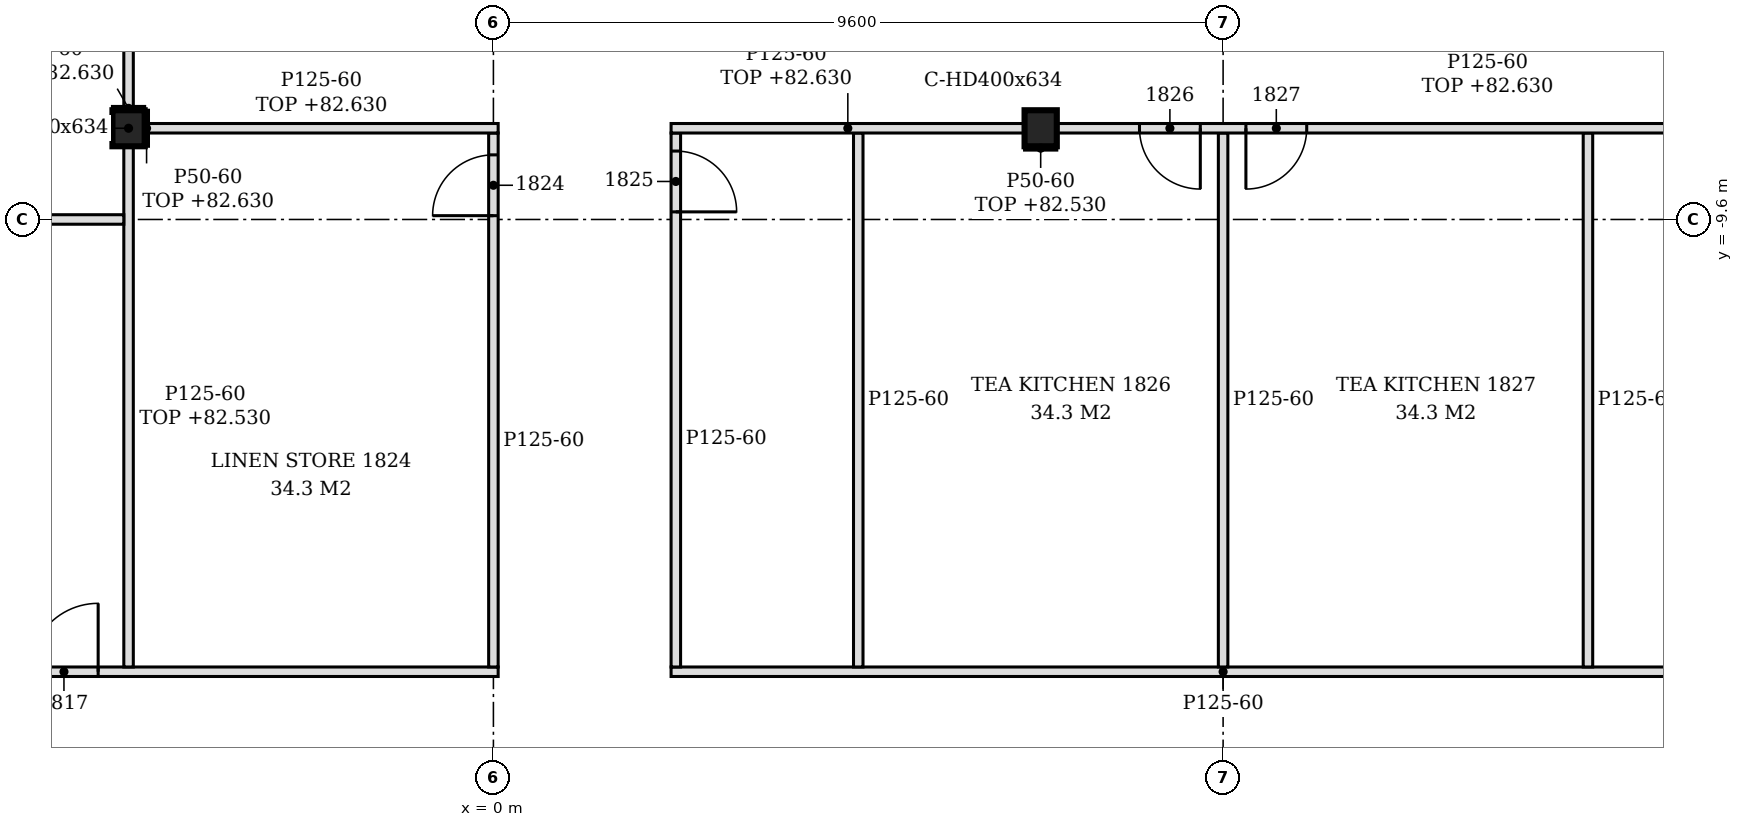
"""IFC4 building model, lengths in metres.
Left out: names, types, materials, properties, quantities, classifications, styles, units other than length and angle.
Written with IfcOpenShell. Run it as: python <this file> out.ifc"""

import sys

from ifc_helpers import new_model, si_unit, direction, frame, frame_2d, origin, origin_2d, place, context, subcontext, project, spatial, polyline, rectangle, i_section, outline, extrude, element, fill, save


model = new_model("IFC4")
c1 = context("Model", 3, precision=1e-05, world=origin(), true_north=direction((0.0, 1.0)))
c2 = subcontext(c1, "Body", "Model", "MODEL_VIEW")
j1 = project(units=[si_unit("LENGTHUNIT", "METRE"), si_unit("PLANEANGLEUNIT", "RADIAN")], contexts=[c1])
p1 = place(None, origin())
s1 = spatial("IfcSite", under=j1, at=p1, CompositionType="ELEMENT")
p2 = place(p1, origin())
s2 = spatial("IfcBuilding", under=s1, at=p2, CompositionType="ELEMENT")
p3 = place(p2, frame((0.0, 0.0, 79.8)))
s3 = spatial("IfcBuildingStorey", under=s2, at=p3, CompositionType="ELEMENT", Elevation=79.8)
for number, where, z_axis, x_axis in (
    (1, (-4.8, -8.4, -0.15), (0.0, 0.0, 1.0), (1.0, 0.0, 0.0)),
    (2, (7.2, -8.4, -0.15), (0.0, 0.0, 1.0), (1.0, 0.0, 0.0)),
):
    element("IfcColumn", number, at=place(p3, frame(where, z_axis=z_axis, x_axis=x_axis)), inside=s3, PredefinedType="COLUMN", context=c2, shape_type="SweptSolid", body=[
        extrude(i_section(OverallWidth=0.424, OverallDepth=0.474, WebThickness=0.048, FlangeThickness=0.077, FilletRadius=0.015, at=origin_2d()), origin(), (0.0, 0.0, 1.0), 3.6),
    ])
p4 = place(p3, frame((-18.413, -15.55, 0.0), z_axis=(0.0, 0.0, 1.0), x_axis=(1.0, 0.0, 0.0)))
e3 = element("IfcWall", 3, at=p4, inside=s3, PredefinedType="PARTITIONING", context=c2, shape_type="SweptSolid", body=[
    extrude(outline(polyline([(0.0, 0.0), (18.475, 0.0), (18.475, 3.45), (13.762, 3.45), (13.76, 2.73), (13.462, 2.73), (13.46, 3.45), (4.163, 3.45), (4.16, 2.93), (3.863, 2.93), (3.861, 3.45), (0.0, 3.45), (0.0, 0.0)])), frame((0.0, 0.062, 0.0), z_axis=(0.0, -1.0, 0.0), x_axis=(1.0, 0.0, 0.0)), (0.0, 0.0, 1.0), 0.125),
])
p5 = place(p4, frame((12.312, 0.0, 0.0)))
e4 = element("IfcOpeningElement", 4, at=p5, cuts=e3, PredefinedType="OPENING", context=c2, shape_type="SweptSolid", body=[
    extrude(rectangle(XDim=0.9, YDim=2.1, at=frame_2d((0.45, 1.05))), frame((0.0, 0.073, 0.0), z_axis=(0.0, -1.0, 0.0), x_axis=(1.0, 0.0, 0.0)), (0.0, 0.0, 1.0), 0.145),
])
p6 = place(p3, frame((2.337, -15.55, 0.0), z_axis=(0.0, 0.0, 1.0), x_axis=(1.0, 0.0, 0.0)))
e5 = element("IfcWall", 5, at=p6, inside=s3, PredefinedType="PARTITIONING", context=c2, shape_type="SweptSolid", body=[
    extrude(outline(polyline([(0.0, 0.0), (14.525, 0.0), (14.525, 3.45), (5.012, 3.45), (5.01, 2.73), (4.712, 2.73), (4.71, 3.45), (0.0, 3.45), (0.0, 0.0)])), frame((0.0, 0.062, 0.0), z_axis=(0.0, -1.0, 0.0), x_axis=(1.0, 0.0, 0.0)), (0.0, 0.0, 1.0), 0.125),
])
p7 = place(p3, frame((-4.8, -15.488, 0.0), z_axis=(0.0, 0.0, 1.0), x_axis=(0.0, 1.0, 0.0)))
e6 = element("IfcWall", 6, at=p7, inside=s3, PredefinedType="PARTITIONING", context=c2, shape_type="SweptSolid", body=[
    extrude(rectangle(XDim=6.851, YDim=0.125, at=frame_2d((3.425, 0.0))), origin(), (0.0, 0.0, 1.0), 2.73),
])
p8 = place(p3, frame((0.0, -15.488, 0.0), z_axis=(0.0, 0.0, 1.0), x_axis=(0.0, 1.0, 0.0)))
e7 = element("IfcWall", 7, at=p8, inside=s3, PredefinedType="PARTITIONING", context=c2, shape_type="SweptSolid", body=[
    extrude(outline(polyline([(0.0, 0.0), (7.025, 0.0), (7.025, 2.83), (6.938, 2.83), (6.936, 3.45), (1.192, 3.45), (1.19, 2.88), (0.982, 2.88), (0.98, 3.45), (0.0, 3.45), (0.0, 0.0)])), frame((0.0, 0.062, 0.0), z_axis=(0.0, -1.0, 0.0), x_axis=(1.0, 0.0, 0.0)), (0.0, 0.0, 1.0), 0.125),
])
p9 = place(p8, frame((5.938, 0.0, 0.0)))
e8 = element("IfcOpeningElement", 8, at=p9, cuts=e7, PredefinedType="OPENING", context=c2, shape_type="SweptSolid", body=[
    extrude(rectangle(XDim=0.8, YDim=2.1, at=frame_2d((0.4, 1.05))), frame((0.0, 0.073, 0.0), z_axis=(0.0, -1.0, 0.0), x_axis=(1.0, 0.0, 0.0)), (0.0, 0.0, 1.0), 0.145),
])
p10 = place(p3, frame((2.4, -15.488, 0.0), z_axis=(0.0, 0.0, 1.0), x_axis=(0.0, 1.0, 0.0)))
e9 = element("IfcWall", 9, at=p10, inside=s3, PredefinedType="PARTITIONING", context=c2, shape_type="SweptSolid", body=[
    extrude(outline(polyline([(0.0, 0.0), (7.025, 0.0), (7.025, 2.83), (6.938, 2.83), (6.936, 3.45), (1.192, 3.45), (1.19, 2.88), (0.982, 2.88), (0.98, 3.45), (0.0, 3.45), (0.0, 0.0)])), frame((0.0, 0.062, 0.0), z_axis=(0.0, -1.0, 0.0), x_axis=(1.0, 0.0, 0.0)), (0.0, 0.0, 1.0), 0.125),
])
p11 = place(p10, frame((5.988, 0.0, 0.0)))
e10 = element("IfcOpeningElement", 10, at=p11, cuts=e9, PredefinedType="OPENING", context=c2, shape_type="SweptSolid", body=[
    extrude(rectangle(XDim=0.8, YDim=2.1, at=frame_2d((0.4, 1.05))), frame((0.0, 0.073, 0.0), z_axis=(0.0, -1.0, 0.0), x_axis=(1.0, 0.0, 0.0)), (0.0, 0.0, 1.0), 0.145),
])
for number, where, z_axis, x_axis in (
    (11, (4.8, -15.488, 0.0), (0.0, 0.0, 1.0), (0.0, 1.0, 0.0)),
    (12, (9.6, -15.488, 0.0), (0.0, 0.0, 1.0), (0.0, 1.0, 0.0)),
    (13, (14.4, -15.488, 0.0), (0.0, 0.0, 1.0), (0.0, 1.0, 0.0)),
):
    element("IfcWall", number, at=place(p3, frame(where, z_axis=z_axis, x_axis=x_axis)), inside=s3, PredefinedType="PARTITIONING", context=c2, shape_type="SweptSolid", body=[
        extrude(outline(polyline([(0.0, 0.0), (7.025, 0.0), (7.025, 2.83), (6.938, 2.83), (6.936, 3.45), (1.192, 3.45), (1.19, 2.88), (0.982, 2.88), (0.98, 3.45), (0.0, 3.45), (0.0, 0.0)])), frame((0.0, 0.062, 0.0), z_axis=(0.0, -1.0, 0.0), x_axis=(1.0, 0.0, 0.0)), (0.0, 0.0, 1.0), 0.125),
    ])
p12 = place(p3, frame((-14.196, -9.6, 0.0), z_axis=(0.0, 0.0, 1.0), x_axis=(1.0, 0.0, 0.0)))
e14 = element("IfcWall", 14, at=p12, inside=s3, PredefinedType="PARTITIONING", context=c2, shape_type="SweptSolid", body=[
    extrude(outline(polyline([(0.0, 0.0), (9.333, 0.0), (9.333, 2.73), (9.246, 2.73), (9.243, 2.93), (0.0, 2.93), (0.0, 0.0)])), frame((0.0, 0.062, 0.0), z_axis=(0.0, -1.0, 0.0), x_axis=(1.0, 0.0, 0.0)), (0.0, 0.0, 1.0), 0.125),
])
p13 = place(p3, frame((-4.588, -8.4, 0.0), z_axis=(0.0, 0.0, 1.0), x_axis=(1.0, 0.0, 0.0)))
e15 = element("IfcWall", 15, at=p13, inside=s3, PredefinedType="PARTITIONING", context=c2, shape_type="SweptSolid", body=[
    extrude(rectangle(XDim=4.65, YDim=0.125, at=frame_2d((2.325, 0.0))), origin(), (0.0, 0.0, 1.0), 2.83),
])
p14 = place(p3, frame((2.337, -8.4, 0.0), z_axis=(0.0, 0.0, 1.0), x_axis=(1.0, 0.0, 0.0)))
e16 = element("IfcWall", 16, at=p14, inside=s3, PredefinedType="PARTITIONING", context=c2, shape_type="SweptSolid", body=[
    extrude(rectangle(XDim=4.651, YDim=0.125, at=frame_2d((2.325, 0.0))), origin(), (0.0, 0.0, 1.0), 2.83),
])
p15 = place(p3, frame((7.412, -8.4, 0.0), z_axis=(0.0, 0.0, 1.0), x_axis=(1.0, 0.0, 0.0)))
e17 = element("IfcWall", 17, at=p15, inside=s3, PredefinedType="PARTITIONING", context=c2, shape_type="SweptSolid", body=[
    extrude(rectangle(XDim=9.45, YDim=0.125, at=frame_2d((4.725, 0.0))), origin(), (0.0, 0.0, 1.0), 2.83),
])
p16 = place(p15, frame((1.088, 0.0, 0.0)))
e18 = element("IfcOpeningElement", 18, at=p16, cuts=e17, PredefinedType="OPENING", context=c2, shape_type="SweptSolid", body=[
    extrude(rectangle(XDim=0.8, YDim=2.1, at=frame_2d((0.4, 1.05))), frame((0.0, 0.073, 0.0), z_axis=(0.0, -1.0, 0.0), x_axis=(1.0, 0.0, 0.0)), (0.0, 0.0, 1.0), 0.145),
])
p17 = place(p15, frame((2.488, 0.0, 0.0)))
e19 = element("IfcOpeningElement", 19, at=p17, cuts=e17, PredefinedType="OPENING", context=c2, shape_type="SweptSolid", body=[
    extrude(rectangle(XDim=0.8, YDim=2.1, at=frame_2d((0.4, 1.05))), frame((0.0, 0.073, 0.0), z_axis=(0.0, -1.0, 0.0), x_axis=(1.0, 0.0, 0.0)), (0.0, 0.0, 1.0), 0.145),
])
p18 = place(p3, frame((-4.8, -8.163, 0.0), z_axis=(0.0, 0.0, 1.0), x_axis=(0.0, 1.0, 0.0)))
e20 = element("IfcWall", 20, at=p18, inside=s3, PredefinedType="PARTITIONING", context=c2, shape_type="SweptSolid", body=[
    extrude(rectangle(XDim=8.101, YDim=0.125, at=frame_2d((4.05, 0.0))), origin(), (0.0, 0.0, 1.0), 2.83),
])
p19 = place(p18, frame((2.163, 0.0, 0.0)))
e21 = element("IfcOpeningElement", 21, at=p19, cuts=e20, PredefinedType="OPENING", context=c2, shape_type="SweptSolid", body=[
    extrude(rectangle(XDim=0.9, YDim=2.1, at=frame_2d((0.45, 1.05))), frame((0.0, 0.073, 0.0), z_axis=(0.0, -1.0, 0.0), x_axis=(1.0, 0.0, 0.0)), (0.0, 0.0, 1.0), 0.145),
])
p20 = place(p3, frame((-4.563, -8.637, 0.0), z_axis=(0.0, 0.0, 1.0), x_axis=(0.0, 1.0, 0.0)))
e22 = element("IfcWall", 22, at=p20, inside=s3, PredefinedType="PARTITIONING", context=c2, shape_type="SweptSolid", body=[
    extrude(rectangle(XDim=0.474, YDim=0.05, at=frame_2d((0.237, 0.0))), origin(), (0.0, 0.0, 1.0), 2.83),
])
p21 = place(p3, frame((-5.012, -8.138, 0.0), z_axis=(0.0, 0.0, 1.0), x_axis=(1.0, 0.0, 0.0)))
e23 = element("IfcWall", 23, at=p21, inside=s3, PredefinedType="PARTITIONING", context=c2, shape_type="SweptSolid", body=[
    extrude(rectangle(XDim=0.424, YDim=0.05, at=frame_2d((0.212, 0.0))), origin(), (0.0, 0.0, 1.0), 2.83),
])
p22 = place(p3, frame((6.988, -8.662, 0.0), z_axis=(0.0, 0.0, 1.0), x_axis=(1.0, 0.0, 0.0)))
e24 = element("IfcWall", 24, at=p22, inside=s3, PredefinedType="PARTITIONING", context=c2, shape_type="SweptSolid", body=[
    extrude(rectangle(XDim=0.424, YDim=0.05, at=frame_2d((0.212, 0.0))), origin(), (0.0, 0.0, 1.0), 2.73),
])
p23 = place(p5, origin())
e25 = element("IfcDoor", 25, at=p23, inside=s3, OperationType="SINGLE_SWING_RIGHT", PredefinedType="DOOR", context=c2, shape_type="SweptSolid", body=[
    extrude(rectangle(XDim=0.9, YDim=2.1, at=frame_2d((0.45, 1.05))), frame((0.0, 0.025, 0.0), z_axis=(0.0, -1.0, 0.0), x_axis=(1.0, 0.0, 0.0)), (0.0, 0.0, 1.0), 0.05),
])
fill(e4, e25)
p24 = place(p9, origin())
e26 = element("IfcDoor", 26, at=p24, inside=s3, OperationType="SINGLE_SWING_LEFT", PredefinedType="DOOR", context=c2, shape_type="SweptSolid", body=[
    extrude(rectangle(XDim=0.8, YDim=2.1, at=frame_2d((0.4, 1.05))), frame((0.0, 0.025, 0.0), z_axis=(0.0, -1.0, 0.0), x_axis=(1.0, 0.0, 0.0)), (0.0, 0.0, 1.0), 0.05),
])
fill(e8, e26)
p25 = place(p11, frame((0.8, 0.0, 0.0), z_axis=(0.0, 0.0, 1.0), x_axis=(-1.0, 0.0, 0.0)))
e27 = element("IfcDoor", 27, at=p25, inside=s3, OperationType="SINGLE_SWING_RIGHT", PredefinedType="DOOR", context=c2, shape_type="SweptSolid", body=[
    extrude(rectangle(XDim=0.8, YDim=2.1, at=frame_2d((0.4, 1.05))), frame((0.0, 0.025, 0.0), z_axis=(0.0, -1.0, 0.0), x_axis=(1.0, 0.0, 0.0)), (0.0, 0.0, 1.0), 0.05),
])
fill(e10, e27)
p26 = place(p16, frame((0.8, 0.0, 0.0), z_axis=(0.0, 0.0, 1.0), x_axis=(-1.0, 0.0, 0.0)))
e28 = element("IfcDoor", 28, at=p26, inside=s3, OperationType="SINGLE_SWING_LEFT", PredefinedType="DOOR", context=c2, shape_type="SweptSolid", body=[
    extrude(rectangle(XDim=0.8, YDim=2.1, at=frame_2d((0.4, 1.05))), frame((0.0, 0.025, 0.0), z_axis=(0.0, -1.0, 0.0), x_axis=(1.0, 0.0, 0.0)), (0.0, 0.0, 1.0), 0.05),
])
fill(e18, e28)
p27 = place(p17, frame((0.8, 0.0, 0.0), z_axis=(0.0, 0.0, 1.0), x_axis=(-1.0, 0.0, 0.0)))
e29 = element("IfcDoor", 29, at=p27, inside=s3, OperationType="SINGLE_SWING_RIGHT", PredefinedType="DOOR", context=c2, shape_type="SweptSolid", body=[
    extrude(rectangle(XDim=0.8, YDim=2.1, at=frame_2d((0.4, 1.05))), frame((0.0, 0.025, 0.0), z_axis=(0.0, -1.0, 0.0), x_axis=(1.0, 0.0, 0.0)), (0.0, 0.0, 1.0), 0.05),
])
fill(e19, e29)
save(model, sys.argv[1])
